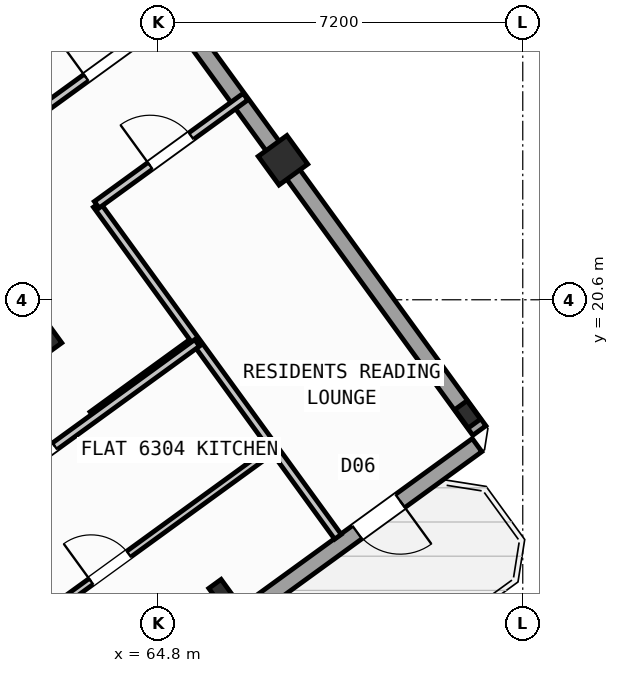
"""IFC4 building model, lengths in metres.
Left out: names, types, materials, properties, quantities, classifications, styles, units other than length and angle.
Written with IfcOpenShell. Run it as: python <this file> out.ifc"""

import sys

from ifc_helpers import new_model, si_unit, direction, frame, frame_2d, origin, origin_2d, place, context, subcontext, project, spatial, rectangle, hollow_rectangle, i_section, extrude, source, transform, mapped, element, fill, save


model = new_model("IFC4")
c1 = context("Model", 3, precision=1e-05, world=origin(), true_north=direction((0.0, 1.0)))
c2 = subcontext(c1, "Body", "Model", "MODEL_VIEW")
j1 = project(units=[si_unit("LENGTHUNIT", "METRE"), si_unit("PLANEANGLEUNIT", "RADIAN")], contexts=[c1])
p1 = place(None, origin())
s1 = spatial("IfcSite", under=j1, at=p1, CompositionType="ELEMENT")
p2 = place(p1, origin())
s2 = spatial("IfcBuilding", under=s1, at=p2, CompositionType="ELEMENT")
p3 = place(p2, frame((0.0, 0.0, 251.1)))
s3 = spatial("IfcBuildingStorey", under=s2, at=p3, CompositionType="ELEMENT", Elevation=251.1)
m1 = source(origin(), c2, "Body", "SweptSolid", [
    extrude(i_section(OverallWidth=0.3, OverallDepth=0.45, WebThickness=0.014, FlangeThickness=0.026, at=origin_2d()), origin(), (0.0, 0.0, 1.0), 3.6),
])
p4 = place(p3, frame((66.058, 14.811, 0.0), z_axis=(0.0, 0.0, 1.0), x_axis=(0.809016994375, 0.587785252292, 0.0)))
e1 = element("IfcColumn", 1, at=p4, inside=s3, PredefinedType="COLUMN", context=c2, shape_type="MappedRepresentation", body=[
    mapped(m1, transform((0.0, 0.0, 0.0), scale=1.0)),
])
m2 = source(origin(), c2, "Body", "SweptSolid", [
    extrude(hollow_rectangle(XDim=0.7, YDim=0.7, WallThickness=0.028, at=origin_2d()), origin(), (0.0, 0.0, 1.0), 3.6),
])
p5 = place(p3, frame((62.414, 19.827, 0.0), z_axis=(0.0, 0.0, 1.0), x_axis=(0.809016994375, 0.587785252292, 0.0)))
e2 = element("IfcColumn", 2, at=p5, inside=s3, PredefinedType="COLUMN", context=c2, shape_type="MappedRepresentation", body=[
    mapped(m2, transform((0.0, 0.0, 0.0), scale=1.0)),
])
p6 = place(p3, frame((70.912, 18.338, 0.0), z_axis=(0.0, 0.0, 1.0), x_axis=(0.809016994375, 0.587785252292, 0.0)))
e3 = element("IfcColumn", 3, at=p6, inside=s3, PredefinedType="COLUMN", context=c2, shape_type="MappedRepresentation", body=[
    mapped(m1, transform((0.0, 0.0, 0.0), scale=1.0)),
])
p7 = place(p3, frame((67.268, 23.354, 0.0), z_axis=(0.0, 0.0, 1.0), x_axis=(0.809016994375, 0.587785252292, 0.0)))
e4 = element("IfcColumn", 4, at=p7, inside=s3, PredefinedType="COLUMN", context=c2, shape_type="MappedRepresentation", body=[
    mapped(m2, transform((0.0, 0.0, 0.0), scale=1.0)),
])
p8 = place(p3, frame((58.455, 35.484, 0.0), z_axis=(0.0, 0.0, 1.0), x_axis=(0.587783625747, -0.809018176127, 0.0)))
e5 = element("IfcWall", 5, at=p8, inside=s3, PredefinedType="STANDARD", context=c2, shape_type="SweptSolid", body=[
    extrude(rectangle(XDim=21.587, YDim=0.32, at=frame_2d((10.794, 0.0))), origin(), (0.0, 0.0, 1.0), 2.845),
])
p9 = place(p8, frame((1.65, 0.0, 0.9)))
e6 = element("IfcOpeningElement", 6, at=p9, cuts=e5, PredefinedType="OPENING", context=c2, shape_type="SweptSolid", body=[
    extrude(rectangle(XDim=1.65, YDim=1.45, at=frame_2d((0.825, 0.725))), frame((0.0, 0.17, 0.0), z_axis=(0.0, -1.0, 0.0), x_axis=(1.0, 0.0, 0.0)), (0.0, 0.0, 1.0), 0.34),
])
p10 = place(p8, frame((5.255, 0.0, 0.9)))
e7 = element("IfcOpeningElement", 7, at=p10, cuts=e5, PredefinedType="OPENING", context=c2, shape_type="SweptSolid", body=[
    extrude(rectangle(XDim=1.35, YDim=1.45, at=frame_2d((0.675, 0.725))), frame((0.0, 0.17, 0.0), z_axis=(0.0, -1.0, 0.0), x_axis=(1.0, 0.0, 0.0)), (0.0, 0.0, 1.0), 0.34),
])
p11 = place(p8, frame((8.654, 0.0, 0.95)))
e8 = element("IfcOpeningElement", 8, at=p11, cuts=e5, PredefinedType="OPENING", context=c2, shape_type="SweptSolid", body=[
    extrude(rectangle(XDim=1.95, YDim=1.35, at=frame_2d((0.975, 0.675))), frame((0.0, 0.17, 0.0), z_axis=(0.0, -1.0, 0.0), x_axis=(1.0, 0.0, 0.0)), (0.0, 0.0, 1.0), 0.34),
])
p12 = place(p3, frame((71.098, 17.731, 0.0), z_axis=(0.0, 0.0, 1.0), x_axis=(-0.809021120468, -0.587779573171, 0.0)))
e9 = element("IfcWall", 9, at=p12, inside=s3, PredefinedType="STANDARD", context=c2, shape_type="SweptSolid", body=[
    extrude(rectangle(XDim=17.588, YDim=0.32, at=frame_2d((8.794, 0.0))), origin(), (0.0, 0.0, 1.0), 3.32),
])
p13 = place(p12, frame((1.875, 0.0, 0.0)))
e10 = element("IfcOpeningElement", 10, at=p13, cuts=e9, PredefinedType="OPENING", context=c2, shape_type="SweptSolid", body=[
    extrude(rectangle(XDim=1.05, YDim=2.15, at=frame_2d((0.525, 1.075))), frame((0.0, 0.17, 0.0), z_axis=(0.0, -1.0, 0.0), x_axis=(1.0, 0.0, 0.0)), (0.0, 0.0, 1.0), 0.34),
])
p14 = place(p12, frame((8.061, 0.0, 0.9)))
e11 = element("IfcOpeningElement", 11, at=p14, cuts=e9, PredefinedType="OPENING", context=c2, shape_type="SweptSolid", body=[
    extrude(rectangle(XDim=1.65, YDim=1.45, at=frame_2d((0.825, 0.725))), frame((0.0, 0.17, 0.0), z_axis=(0.0, -1.0, 0.0), x_axis=(1.0, 0.0, 0.0)), (0.0, 0.0, 1.0), 0.34),
])
p15 = place(p12, frame((12.96, 0.0, 0.9)))
e12 = element("IfcOpeningElement", 12, at=p15, cuts=e9, PredefinedType="OPENING", context=c2, shape_type="SweptSolid", body=[
    extrude(rectangle(XDim=1.65, YDim=1.45, at=frame_2d((0.825, 0.725))), frame((0.0, 0.17, 0.0), z_axis=(0.0, -1.0, 0.0), x_axis=(1.0, 0.0, 0.0)), (0.0, 0.0, 1.0), 0.34),
])
p16 = place(p3, frame((63.507, 18.322, 0.0), z_axis=(0.0, 0.0, 1.0), x_axis=(0.809034604122, 0.587761013791, 0.0)))
e13 = element("IfcWall", 13, at=p16, inside=s3, PredefinedType="PARTITIONING", context=c2, shape_type="SweptSolid", body=[
    extrude(rectangle(XDim=2.51, YDim=0.16, at=frame_2d((1.255, 0.0))), origin(), (0.0, 0.0, 1.0), 3.31),
])
p17 = place(p3, frame((68.353, 15.922, 0.0), z_axis=(0.0, 0.0, 1.0), x_axis=(-0.58776839458, 0.809029241952, 0.0)))
e14 = element("IfcWall", 14, at=p17, inside=s3, PredefinedType="PARTITIONING", context=c2, shape_type="SweptSolid", body=[
    extrude(rectangle(XDim=8.1, YDim=0.16, at=frame_2d((4.05, 0.0))), origin(), (0.0, 0.0, 1.0), 3.31),
])
p18 = place(p3, frame((63.592, 22.475, 0.0), z_axis=(0.0, 0.0, 1.0), x_axis=(0.809035546126, 0.58775971715, 0.0)))
e15 = element("IfcWall", 15, at=p18, inside=s3, PredefinedType="PARTITIONING", context=c2, shape_type="SweptSolid", body=[
    extrude(rectangle(XDim=3.63, YDim=0.16, at=frame_2d((1.815, 0.0))), origin(), (0.0, 0.0, 1.0), 3.31),
])
p19 = place(p18, frame((1.305, 0.0, 0.0)))
e16 = element("IfcOpeningElement", 16, at=p19, cuts=e15, PredefinedType="OPENING", context=c2, shape_type="SweptSolid", body=[
    extrude(rectangle(XDim=1.0, YDim=2.1, at=frame_2d((0.5, 1.05))), frame((0.0, 0.09, 0.0), z_axis=(0.0, -1.0, 0.0), x_axis=(1.0, 0.0, 0.0)), (0.0, 0.0, 1.0), 0.18),
])
p20 = place(p3, frame((62.328, 24.215, 0.0), z_axis=(0.0, 0.0, 1.0), x_axis=(0.809003564202, 0.587803736896, 0.0)))
e17 = element("IfcWall", 17, at=p20, inside=s3, PredefinedType="PARTITIONING", context=c2, shape_type="SweptSolid", body=[
    extrude(rectangle(XDim=3.63, YDim=0.16, at=frame_2d((1.815, 0.0))), origin(), (0.0, 0.0, 1.0), 3.31),
])
p21 = place(p20, frame((1.305, 0.0, 0.0)))
e18 = element("IfcOpeningElement", 18, at=p21, cuts=e17, PredefinedType="OPENING", context=c2, shape_type="SweptSolid", body=[
    extrude(rectangle(XDim=1.0, YDim=2.1, at=frame_2d((0.5, 1.05))), frame((0.0, 0.09, 0.0), z_axis=(0.0, -1.0, 0.0), x_axis=(1.0, 0.0, 0.0)), (0.0, 0.0, 1.0), 0.18),
])
p22 = place(p3, frame((53.705, 11.126, 0.0), z_axis=(0.0, 0.0, 1.0), x_axis=(0.809014504436, 0.587788679384, 0.0)))
e19 = element("IfcWall", 19, at=p22, inside=s3, PredefinedType="PARTITIONING", context=c2, shape_type="SweptSolid", body=[
    extrude(rectangle(XDim=14.67, YDim=0.16, at=frame_2d((7.335, 0.0))), origin(), (0.0, 0.0, 1.0), 3.31),
])
p23 = place(p22, frame((10.2, 0.0, 0.0)))
e20 = element("IfcOpeningElement", 20, at=p23, cuts=e19, PredefinedType="OPENING", context=c2, shape_type="SweptSolid", body=[
    extrude(rectangle(XDim=1.0, YDim=2.1, at=frame_2d((0.5, 1.05))), frame((0.0, 0.09, 0.0), z_axis=(0.0, -1.0, 0.0), x_axis=(1.0, 0.0, 0.0)), (0.0, 0.0, 1.0), 0.18),
])
p24 = place(p3, frame((56.249, 9.785, 0.0), z_axis=(0.0, 0.0, 1.0), x_axis=(0.809011747655, 0.587792473715, 0.0)))
e21 = element("IfcWall", 21, at=p24, inside=s3, PredefinedType="PLUMBINGWALL", context=c2, shape_type="SweptSolid", body=[
    extrude(rectangle(XDim=13.4, YDim=0.14, at=frame_2d((6.7, 0.0))), origin(), (0.0, 0.0, 1.0), 3.31),
])
p25 = place(p24, frame((8.94, 0.0, 0.0)))
e22 = element("IfcOpeningElement", 22, at=p25, cuts=e21, PredefinedType="OPENING", context=c2, shape_type="SweptSolid", body=[
    extrude(rectangle(XDim=0.92, YDim=2.08, at=frame_2d((0.46, 1.04))), frame((0.0, 0.08, 0.0), z_axis=(0.0, -1.0, 0.0), x_axis=(1.0, 0.0, 0.0)), (0.0, 0.0, 1.0), 0.16),
])
m3 = source(origin(), c2, "Body", "SweptSolid", [
    extrude(rectangle(XDim=1.05, YDim=2.15, at=frame_2d((0.525, 1.075))), frame((0.0, 0.025, 0.0), z_axis=(0.0, -1.0, 0.0), x_axis=(1.0, 0.0, 0.0)), (0.0, 0.0, 1.0), 0.05),
])
p26 = place(p13, origin())
e23 = element("IfcDoor", 23, at=p26, inside=s3, OperationType="SINGLE_SWING_LEFT", PredefinedType="DOOR", context=c2, shape_type="MappedRepresentation", body=[
    mapped(m3, transform((0.0, 0.0, 0.0), scale=1.0)),
])
fill(e10, e23)
m4 = source(origin(), c2, "Body", "SweptSolid", [
    extrude(rectangle(XDim=1.0, YDim=2.1, at=frame_2d((0.5, 1.05))), frame((0.0, 0.025, 0.0), z_axis=(0.0, -1.0, 0.0), x_axis=(1.0, 0.0, 0.0)), (0.0, 0.0, 1.0), 0.05),
])
p27 = place(p21, origin())
e24 = element("IfcDoor", 24, at=p27, inside=s3, OperationType="SINGLE_SWING_LEFT", PredefinedType="DOOR", context=c2, shape_type="MappedRepresentation", body=[
    mapped(m4, transform((0.0, 0.0, 0.0), scale=1.0)),
])
fill(e18, e24)
p28 = place(p19, origin())
e25 = element("IfcDoor", 25, at=p28, inside=s3, OperationType="SINGLE_SWING_LEFT", PredefinedType="DOOR", context=c2, shape_type="MappedRepresentation", body=[
    mapped(m4, transform((0.0, 0.0, 0.0), scale=1.0)),
])
fill(e16, e25)
p29 = place(p23, origin())
e26 = element("IfcDoor", 26, at=p29, inside=s3, OperationType="SINGLE_SWING_RIGHT", PredefinedType="DOOR", context=c2, shape_type="MappedRepresentation", body=[
    mapped(m4, transform((0.0, 0.0, 0.0), scale=1.0)),
])
fill(e20, e26)
m5 = source(origin(), c2, "Body", "SweptSolid", [
    extrude(rectangle(XDim=0.92, YDim=2.08, at=frame_2d((0.46, 1.04))), frame((0.0, 0.025, 0.0), z_axis=(0.0, -1.0, 0.0), x_axis=(1.0, 0.0, 0.0)), (0.0, 0.0, 1.0), 0.05),
])
p30 = place(p25, origin())
e27 = element("IfcDoor", 27, at=p30, inside=s3, OperationType="SINGLE_SWING_LEFT", PredefinedType="DOOR", context=c2, shape_type="MappedRepresentation", body=[
    mapped(m5, transform((0.0, 0.0, 0.0), scale=1.0)),
])
fill(e22, e27)
save(model, sys.argv[1])
